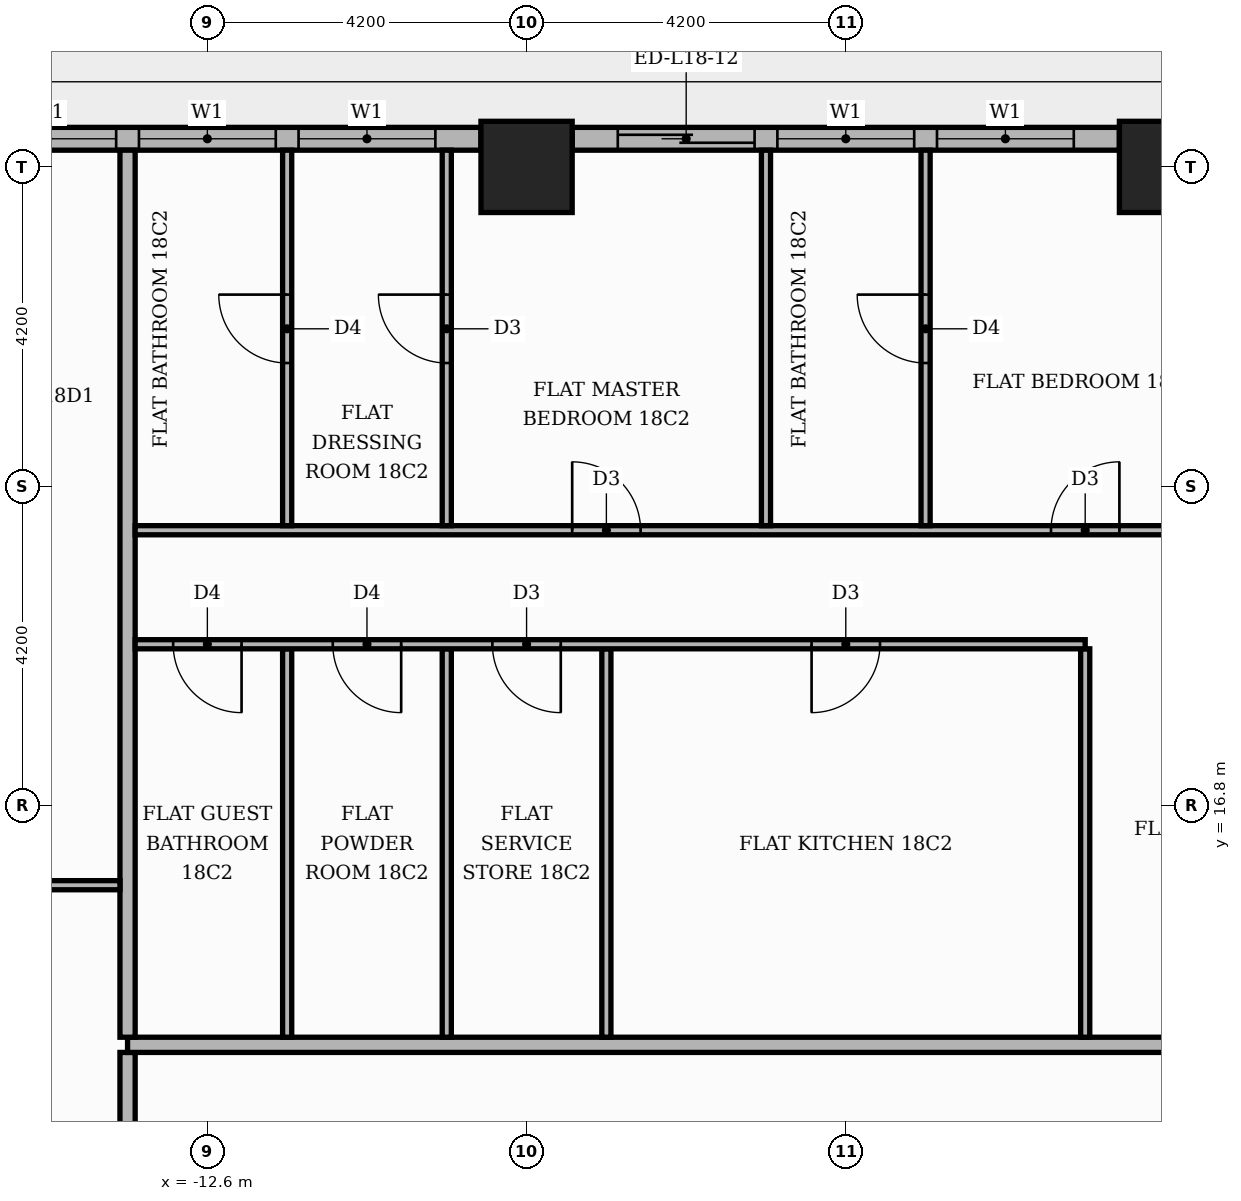
"""IFC4 building model, lengths in metres.
Left out: names, types, materials, properties, quantities, classifications, styles, units other than length and angle.
Written with IfcOpenShell. Run it as: python <this file> out.ifc"""

import sys

from ifc_helpers import new_model, si_unit, direction, frame, frame_2d, origin, origin_2d, place, context, subcontext, project, spatial, rectangle, extrude, element, fill, save


model = new_model("IFC4")
c1 = context("Model", 3, precision=1e-05, world=origin(), true_north=direction((0.0, 1.0)))
c2 = subcontext(c1, "Body", "Model", "MODEL_VIEW")
j1 = project(units=[si_unit("LENGTHUNIT", "METRE"), si_unit("PLANEANGLEUNIT", "RADIAN")], contexts=[c1])
p1 = place(None, origin())
s1 = spatial("IfcSite", under=j1, at=p1, CompositionType="ELEMENT")
p2 = place(p1, origin())
s2 = spatial("IfcBuilding", under=s1, at=p2, CompositionType="ELEMENT")
p3 = place(p2, frame((0.0, 0.0, 79.2)))
s3 = spatial("IfcBuildingStorey", under=s2, at=p3, CompositionType="ELEMENT", Elevation=79.2)
for number, where, z_axis, x_axis in (
    (1, (0.0, 25.2, 0.0), (0.0, 0.0, 1.0), (1.0, 0.0, 0.0)),
    (2, (-8.4, 25.2, 0.0), (0.0, 0.0, 1.0), (1.0, 0.0, 0.0)),
):
    element("IfcColumn", number, at=place(p3, frame(where, z_axis=z_axis, x_axis=x_axis)), inside=s3, PredefinedType="COLUMN", context=c2, shape_type="SweptSolid", body=[
        extrude(rectangle(XDim=1.2, YDim=1.2, at=origin_2d()), origin(), (0.0, 0.0, 1.0), 3.9),
    ])
p4 = place(p3, frame((-0.6, 25.57, 0.0), z_axis=(0.0, 0.0, 1.0), x_axis=(-1.0, 0.0, 0.0)))
e3 = element("IfcWall", 3, at=p4, inside=s3, PredefinedType="STANDARD", context=c2, shape_type="SweptSolid", body=[
    extrude(rectangle(XDim=7.2, YDim=0.3, at=frame_2d((3.6, 0.0))), origin(), (0.0, 0.0, 1.0), 3.48),
])
p5 = place(p4, frame((0.6, 0.0, 0.9)))
e4 = element("IfcOpeningElement", 4, at=p5, cuts=e3, PredefinedType="OPENING", context=c2, shape_type="SweptSolid", body=[
    extrude(rectangle(XDim=1.8, YDim=2.1, at=frame_2d((0.9, 1.05))), frame((0.0, 0.16, 0.0), z_axis=(0.0, -1.0, 0.0), x_axis=(1.0, 0.0, 0.0)), (0.0, 0.0, 1.0), 0.32),
])
p6 = place(p4, frame((2.7, 0.0, 0.9)))
e5 = element("IfcOpeningElement", 5, at=p6, cuts=e3, PredefinedType="OPENING", context=c2, shape_type="SweptSolid", body=[
    extrude(rectangle(XDim=1.8, YDim=2.1, at=frame_2d((0.9, 1.05))), frame((0.0, 0.16, 0.0), z_axis=(0.0, -1.0, 0.0), x_axis=(1.0, 0.0, 0.0)), (0.0, 0.0, 1.0), 0.32),
])
p7 = place(p4, frame((4.8, 0.0, 0.0)))
e6 = element("IfcOpeningElement", 6, at=p7, cuts=e3, PredefinedType="OPENING", context=c2, shape_type="SweptSolid", body=[
    extrude(rectangle(XDim=1.8, YDim=2.4, at=frame_2d((0.9, 1.2))), frame((0.0, 0.16, 0.0), z_axis=(0.0, -1.0, 0.0), x_axis=(1.0, 0.0, 0.0)), (0.0, 0.0, 1.0), 0.32),
])
p8 = place(p3, frame((-9.0, 25.57, 0.0), z_axis=(0.0, 0.0, 1.0), x_axis=(-1.0, 0.0, 0.0)))
e7 = element("IfcWall", 7, at=p8, inside=s3, PredefinedType="STANDARD", context=c2, shape_type="SweptSolid", body=[
    extrude(rectangle(XDim=7.2, YDim=0.3, at=frame_2d((3.6, 0.0))), origin(), (0.0, 0.0, 1.0), 3.48),
])
p9 = place(p8, frame((0.6, 0.0, 0.9)))
e8 = element("IfcOpeningElement", 8, at=p9, cuts=e7, PredefinedType="OPENING", context=c2, shape_type="SweptSolid", body=[
    extrude(rectangle(XDim=1.8, YDim=2.1, at=frame_2d((0.9, 1.05))), frame((0.0, 0.16, 0.0), z_axis=(0.0, -1.0, 0.0), x_axis=(1.0, 0.0, 0.0)), (0.0, 0.0, 1.0), 0.32),
])
p10 = place(p8, frame((2.7, 0.0, 0.9)))
e9 = element("IfcOpeningElement", 9, at=p10, cuts=e7, PredefinedType="OPENING", context=c2, shape_type="SweptSolid", body=[
    extrude(rectangle(XDim=1.8, YDim=2.1, at=frame_2d((0.9, 1.05))), frame((0.0, 0.16, 0.0), z_axis=(0.0, -1.0, 0.0), x_axis=(1.0, 0.0, 0.0)), (0.0, 0.0, 1.0), 0.32),
])
p11 = place(p8, frame((4.8, 0.0, 0.9)))
e10 = element("IfcOpeningElement", 10, at=p11, cuts=e7, PredefinedType="OPENING", context=c2, shape_type="SweptSolid", body=[
    extrude(rectangle(XDim=1.8, YDim=2.1, at=frame_2d((0.9, 1.05))), frame((0.0, 0.16, 0.0), z_axis=(0.0, -1.0, 0.0), x_axis=(1.0, 0.0, 0.0)), (0.0, 0.0, 1.0), 0.32),
])
p12 = place(p3, frame((-13.65, 5.35, 0.0), z_axis=(0.0, 0.0, 1.0), x_axis=(0.0, 1.0, 0.0)))
e11 = element("IfcWall", 11, at=p12, inside=s3, PredefinedType="PARTITIONING", context=c2, shape_type="SweptSolid", body=[
    extrude(rectangle(XDim=8.2, YDim=0.2, at=frame_2d((4.1, 0.0))), origin(), (0.0, 0.0, 1.0), 3.48),
])
p13 = place(p12, frame((5.65, 0.0, 0.0)))
e12 = element("IfcOpeningElement", 12, at=p13, cuts=e11, PredefinedType="OPENING", context=c2, shape_type="SweptSolid", body=[
    extrude(rectangle(XDim=1.1, YDim=2.4, at=frame_2d((0.55, 1.2))), frame((0.0, 0.11, 0.0), z_axis=(0.0, -1.0, 0.0), x_axis=(1.0, 0.0, 0.0)), (0.0, 0.0, 1.0), 0.22),
])
p14 = place(p3, frame((-13.65, 13.65, 0.0), z_axis=(0.0, 0.0, 1.0), x_axis=(1.0, 0.0, 0.0)))
e13 = element("IfcWall", 13, at=p14, inside=s3, PredefinedType="PARTITIONING", context=c2, shape_type="SweptSolid", body=[
    extrude(rectangle(XDim=39.07, YDim=0.2, at=frame_2d((19.535, 0.0))), origin(), (0.0, 0.0, 1.0), 3.48),
])
p15 = place(p14, frame((24.65, 0.0, 0.0)))
e14 = element("IfcOpeningElement", 14, at=p15, cuts=e13, PredefinedType="OPENING", context=c2, shape_type="SweptSolid", body=[
    extrude(rectangle(XDim=1.1, YDim=2.4, at=frame_2d((0.55, 1.2))), frame((0.0, 0.11, 0.0), z_axis=(0.0, -1.0, 0.0), x_axis=(1.0, 0.0, 0.0)), (0.0, 0.0, 1.0), 0.22),
])
p16 = place(p14, frame((14.15, 0.0, 0.0)))
e15 = element("IfcOpeningElement", 15, at=p16, cuts=e13, PredefinedType="OPENING", context=c2, shape_type="SweptSolid", body=[
    extrude(rectangle(XDim=1.1, YDim=2.4, at=frame_2d((0.55, 1.2))), frame((0.0, 0.11, 0.0), z_axis=(0.0, -1.0, 0.0), x_axis=(1.0, 0.0, 0.0)), (0.0, 0.0, 1.0), 0.22),
])
p17 = place(p3, frame((-13.65, 13.75, 0.0), z_axis=(0.0, 0.0, 1.0), x_axis=(0.0, 1.0, 0.0)))
e16 = element("IfcWall", 16, at=p17, inside=s3, PredefinedType="PARTITIONING", context=c2, shape_type="SweptSolid", body=[
    extrude(rectangle(XDim=11.67, YDim=0.2, at=frame_2d((5.835, 0.0))), origin(), (0.0, 0.0, 1.0), 3.48),
])
for number, where, z_axis, x_axis in (
    (17, (-11.55, 13.75, 0.0), (0.0, 0.0, 1.0), (0.0, 1.0, 0.0)),
    (18, (-9.45, 13.75, 0.0), (0.0, 0.0, 1.0), (0.0, 1.0, 0.0)),
    (19, (-7.35, 13.75, 0.0), (0.0, 0.0, 1.0), (0.0, 1.0, 0.0)),
    (20, (-1.05, 13.75, 0.0), (0.0, 0.0, 1.0), (0.0, 1.0, 0.0)),
):
    element("IfcWall", number, at=place(p3, frame(where, z_axis=z_axis, x_axis=x_axis)), inside=s3, PredefinedType="PARTITIONING", context=c2, shape_type="SweptSolid", body=[
        extrude(rectangle(XDim=5.11, YDim=0.12, at=frame_2d((2.555, 0.0))), origin(), (0.0, 0.0, 1.0), 3.48),
    ])
p18 = place(p3, frame((-19.82, 15.75, 0.0), z_axis=(0.0, 0.0, 1.0), x_axis=(1.0, 0.0, 0.0)))
e21 = element("IfcWall", 21, at=p18, inside=s3, PredefinedType="PARTITIONING", context=c2, shape_type="SweptSolid", body=[
    extrude(rectangle(XDim=6.07, YDim=0.12, at=frame_2d((3.035, 0.0))), origin(), (0.0, 0.0, 1.0), 3.48),
])
p19 = place(p18, frame((2.585, 0.0, 0.0)))
e22 = element("IfcOpeningElement", 22, at=p19, cuts=e21, PredefinedType="OPENING", context=c2, shape_type="SweptSolid", body=[
    extrude(rectangle(XDim=1.0, YDim=2.1, at=frame_2d((0.5, 1.05))), frame((0.0, 0.07, 0.0), z_axis=(0.0, -1.0, 0.0), x_axis=(1.0, 0.0, 0.0)), (0.0, 0.0, 1.0), 0.14),
])
p20 = place(p3, frame((-13.55, 18.92, 0.0), z_axis=(0.0, 0.0, 1.0), x_axis=(1.0, 0.0, 0.0)))
e23 = element("IfcWall", 23, at=p20, inside=s3, PredefinedType="PARTITIONING", context=c2, shape_type="SweptSolid", body=[
    extrude(rectangle(XDim=12.5, YDim=0.12, at=frame_2d((6.25, 0.0))), origin(), (0.0, 0.0, 1.0), 3.48),
])
p21 = place(p20, frame((8.9, 0.0, 0.0)))
e24 = element("IfcOpeningElement", 24, at=p21, cuts=e23, PredefinedType="OPENING", context=c2, shape_type="SweptSolid", body=[
    extrude(rectangle(XDim=0.9, YDim=2.1, at=frame_2d((0.45, 1.05))), frame((0.0, 0.07, 0.0), z_axis=(0.0, -1.0, 0.0), x_axis=(1.0, 0.0, 0.0)), (0.0, 0.0, 1.0), 0.14),
])
p22 = place(p20, frame((4.7, 0.0, 0.0)))
e25 = element("IfcOpeningElement", 25, at=p22, cuts=e23, PredefinedType="OPENING", context=c2, shape_type="SweptSolid", body=[
    extrude(rectangle(XDim=0.9, YDim=2.1, at=frame_2d((0.45, 1.05))), frame((0.0, 0.07, 0.0), z_axis=(0.0, -1.0, 0.0), x_axis=(1.0, 0.0, 0.0)), (0.0, 0.0, 1.0), 0.14),
])
p23 = place(p20, frame((2.6, 0.0, 0.0)))
e26 = element("IfcOpeningElement", 26, at=p23, cuts=e23, PredefinedType="OPENING", context=c2, shape_type="SweptSolid", body=[
    extrude(rectangle(XDim=0.9, YDim=2.1, at=frame_2d((0.45, 1.05))), frame((0.0, 0.07, 0.0), z_axis=(0.0, -1.0, 0.0), x_axis=(1.0, 0.0, 0.0)), (0.0, 0.0, 1.0), 0.14),
])
p24 = place(p20, frame((0.5, 0.0, 0.0)))
e27 = element("IfcOpeningElement", 27, at=p24, cuts=e23, PredefinedType="OPENING", context=c2, shape_type="SweptSolid", body=[
    extrude(rectangle(XDim=0.9, YDim=2.1, at=frame_2d((0.45, 1.05))), frame((0.0, 0.07, 0.0), z_axis=(0.0, -1.0, 0.0), x_axis=(1.0, 0.0, 0.0)), (0.0, 0.0, 1.0), 0.14),
])
p25 = place(p3, frame((-13.55, 20.42, 0.0), z_axis=(0.0, 0.0, 1.0), x_axis=(1.0, 0.0, 0.0)))
e28 = element("IfcWall", 28, at=p25, inside=s3, PredefinedType="PARTITIONING", context=c2, shape_type="SweptSolid", body=[
    extrude(rectangle(XDim=18.7, YDim=0.12, at=frame_2d((9.35, 0.0))), origin(), (0.0, 0.0, 1.0), 3.48),
])
p26 = place(p25, frame((16.2, 0.0, 0.0)))
e29 = element("IfcOpeningElement", 29, at=p26, cuts=e28, PredefinedType="OPENING", context=c2, shape_type="SweptSolid", body=[
    extrude(rectangle(XDim=1.0, YDim=2.1, at=frame_2d((0.5, 1.05))), frame((0.0, 0.07, 0.0), z_axis=(0.0, -1.0, 0.0), x_axis=(1.0, 0.0, 0.0)), (0.0, 0.0, 1.0), 0.14),
])
p27 = place(p25, frame((12.05, 0.0, 0.0)))
e30 = element("IfcOpeningElement", 30, at=p27, cuts=e28, PredefinedType="OPENING", context=c2, shape_type="SweptSolid", body=[
    extrude(rectangle(XDim=0.9, YDim=2.1, at=frame_2d((0.45, 1.05))), frame((0.0, 0.07, 0.0), z_axis=(0.0, -1.0, 0.0), x_axis=(1.0, 0.0, 0.0)), (0.0, 0.0, 1.0), 0.14),
])
p28 = place(p25, frame((5.75, 0.0, 0.0)))
e31 = element("IfcOpeningElement", 31, at=p28, cuts=e28, PredefinedType="OPENING", context=c2, shape_type="SweptSolid", body=[
    extrude(rectangle(XDim=0.9, YDim=2.1, at=frame_2d((0.45, 1.05))), frame((0.0, 0.07, 0.0), z_axis=(0.0, -1.0, 0.0), x_axis=(1.0, 0.0, 0.0)), (0.0, 0.0, 1.0), 0.14),
])
p29 = place(p3, frame((-11.55, 20.48, 0.0), z_axis=(0.0, 0.0, 1.0), x_axis=(0.0, 1.0, 0.0)))
e32 = element("IfcWall", 32, at=p29, inside=s3, PredefinedType="PARTITIONING", context=c2, shape_type="SweptSolid", body=[
    extrude(rectangle(XDim=4.94, YDim=0.12, at=frame_2d((2.47, 0.0))), origin(), (0.0, 0.0, 1.0), 3.48),
])
p30 = place(p29, frame((2.14, 0.0, 0.0)))
e33 = element("IfcOpeningElement", 33, at=p30, cuts=e32, PredefinedType="OPENING", context=c2, shape_type="SweptSolid", body=[
    extrude(rectangle(XDim=0.9, YDim=2.1, at=frame_2d((0.45, 1.05))), frame((0.0, 0.07, 0.0), z_axis=(0.0, -1.0, 0.0), x_axis=(1.0, 0.0, 0.0)), (0.0, 0.0, 1.0), 0.14),
])
p31 = place(p3, frame((-9.45, 20.48, 0.0), z_axis=(0.0, 0.0, 1.0), x_axis=(0.0, 1.0, 0.0)))
e34 = element("IfcWall", 34, at=p31, inside=s3, PredefinedType="PARTITIONING", context=c2, shape_type="SweptSolid", body=[
    extrude(rectangle(XDim=4.94, YDim=0.12, at=frame_2d((2.47, 0.0))), origin(), (0.0, 0.0, 1.0), 3.48),
])
p32 = place(p31, frame((2.14, 0.0, 0.0)))
e35 = element("IfcOpeningElement", 35, at=p32, cuts=e34, PredefinedType="OPENING", context=c2, shape_type="SweptSolid", body=[
    extrude(rectangle(XDim=0.9, YDim=2.1, at=frame_2d((0.45, 1.05))), frame((0.0, 0.07, 0.0), z_axis=(0.0, -1.0, 0.0), x_axis=(1.0, 0.0, 0.0)), (0.0, 0.0, 1.0), 0.14),
])
p33 = place(p3, frame((-5.25, 20.48, 0.0), z_axis=(0.0, 0.0, 1.0), x_axis=(0.0, 1.0, 0.0)))
e36 = element("IfcWall", 36, at=p33, inside=s3, PredefinedType="PARTITIONING", context=c2, shape_type="SweptSolid", body=[
    extrude(rectangle(XDim=4.94, YDim=0.12, at=frame_2d((2.47, 0.0))), origin(), (0.0, 0.0, 1.0), 3.48),
])
p34 = place(p3, frame((-3.15, 20.48, 0.0), z_axis=(0.0, 0.0, 1.0), x_axis=(0.0, 1.0, 0.0)))
e37 = element("IfcWall", 37, at=p34, inside=s3, PredefinedType="PARTITIONING", context=c2, shape_type="SweptSolid", body=[
    extrude(rectangle(XDim=4.94, YDim=0.12, at=frame_2d((2.47, 0.0))), origin(), (0.0, 0.0, 1.0), 3.48),
])
p35 = place(p34, frame((2.14, 0.0, 0.0)))
e38 = element("IfcOpeningElement", 38, at=p35, cuts=e37, PredefinedType="OPENING", context=c2, shape_type="SweptSolid", body=[
    extrude(rectangle(XDim=0.9, YDim=2.1, at=frame_2d((0.45, 1.05))), frame((0.0, 0.07, 0.0), z_axis=(0.0, -1.0, 0.0), x_axis=(1.0, 0.0, 0.0)), (0.0, 0.0, 1.0), 0.14),
])
p36 = place(p5, origin())
e39 = element("IfcWindow", 39, at=p36, inside=s3, PartitioningType="SINGLE_PANEL", PredefinedType="WINDOW", context=c2, shape_type="SweptSolid", body=[
    extrude(rectangle(XDim=1.8, YDim=2.1, at=frame_2d((0.9, 1.05))), frame((0.0, 0.03, 0.0), z_axis=(0.0, -1.0, 0.0), x_axis=(1.0, 0.0, 0.0)), (0.0, 0.0, 1.0), 0.06),
])
fill(e4, e39)
p37 = place(p6, origin())
e40 = element("IfcWindow", 40, at=p37, inside=s3, PartitioningType="SINGLE_PANEL", PredefinedType="WINDOW", context=c2, shape_type="SweptSolid", body=[
    extrude(rectangle(XDim=1.8, YDim=2.1, at=frame_2d((0.9, 1.05))), frame((0.0, 0.03, 0.0), z_axis=(0.0, -1.0, 0.0), x_axis=(1.0, 0.0, 0.0)), (0.0, 0.0, 1.0), 0.06),
])
fill(e5, e40)
p38 = place(p7, origin())
e41 = element("IfcDoor", 41, at=p38, inside=s3, OperationType="SLIDING_TO_RIGHT", PredefinedType="DOOR", context=c2, shape_type="SweptSolid", body=[
    extrude(rectangle(XDim=1.8, YDim=2.4, at=frame_2d((0.9, 1.2))), frame((0.0, 0.025, 0.0), z_axis=(0.0, -1.0, 0.0), x_axis=(1.0, 0.0, 0.0)), (0.0, 0.0, 1.0), 0.05),
])
fill(e6, e41)
p39 = place(p9, origin())
e42 = element("IfcWindow", 42, at=p39, inside=s3, PartitioningType="SINGLE_PANEL", PredefinedType="WINDOW", context=c2, shape_type="SweptSolid", body=[
    extrude(rectangle(XDim=1.8, YDim=2.1, at=frame_2d((0.9, 1.05))), frame((0.0, 0.03, 0.0), z_axis=(0.0, -1.0, 0.0), x_axis=(1.0, 0.0, 0.0)), (0.0, 0.0, 1.0), 0.06),
])
fill(e8, e42)
p40 = place(p10, origin())
e43 = element("IfcWindow", 43, at=p40, inside=s3, PartitioningType="SINGLE_PANEL", PredefinedType="WINDOW", context=c2, shape_type="SweptSolid", body=[
    extrude(rectangle(XDim=1.8, YDim=2.1, at=frame_2d((0.9, 1.05))), frame((0.0, 0.03, 0.0), z_axis=(0.0, -1.0, 0.0), x_axis=(1.0, 0.0, 0.0)), (0.0, 0.0, 1.0), 0.06),
])
fill(e9, e43)
p41 = place(p11, origin())
e44 = element("IfcWindow", 44, at=p41, inside=s3, PartitioningType="SINGLE_PANEL", PredefinedType="WINDOW", context=c2, shape_type="SweptSolid", body=[
    extrude(rectangle(XDim=1.8, YDim=2.1, at=frame_2d((0.9, 1.05))), frame((0.0, 0.03, 0.0), z_axis=(0.0, -1.0, 0.0), x_axis=(1.0, 0.0, 0.0)), (0.0, 0.0, 1.0), 0.06),
])
fill(e10, e44)
p42 = place(p21, frame((0.9, 0.0, 0.0), z_axis=(0.0, 0.0, 1.0), x_axis=(-1.0, 0.0, 0.0)))
e45 = element("IfcDoor", 45, at=p42, inside=s3, OperationType="SINGLE_SWING_LEFT", PredefinedType="DOOR", context=c2, shape_type="SweptSolid", body=[
    extrude(rectangle(XDim=0.9, YDim=2.1, at=frame_2d((0.45, 1.05))), frame((0.0, 0.025, 0.0), z_axis=(0.0, -1.0, 0.0), x_axis=(1.0, 0.0, 0.0)), (0.0, 0.0, 1.0), 0.05),
])
fill(e24, e45)
p43 = place(p22, frame((0.9, 0.0, 0.0), z_axis=(0.0, 0.0, 1.0), x_axis=(-1.0, 0.0, 0.0)))
e46 = element("IfcDoor", 46, at=p43, inside=s3, OperationType="SINGLE_SWING_RIGHT", PredefinedType="DOOR", context=c2, shape_type="SweptSolid", body=[
    extrude(rectangle(XDim=0.9, YDim=2.1, at=frame_2d((0.45, 1.05))), frame((0.0, 0.025, 0.0), z_axis=(0.0, -1.0, 0.0), x_axis=(1.0, 0.0, 0.0)), (0.0, 0.0, 1.0), 0.05),
])
fill(e25, e46)
p44 = place(p23, frame((0.9, 0.0, 0.0), z_axis=(0.0, 0.0, 1.0), x_axis=(-1.0, 0.0, 0.0)))
e47 = element("IfcDoor", 47, at=p44, inside=s3, OperationType="SINGLE_SWING_RIGHT", PredefinedType="DOOR", context=c2, shape_type="SweptSolid", body=[
    extrude(rectangle(XDim=0.9, YDim=2.1, at=frame_2d((0.45, 1.05))), frame((0.0, 0.025, 0.0), z_axis=(0.0, -1.0, 0.0), x_axis=(1.0, 0.0, 0.0)), (0.0, 0.0, 1.0), 0.05),
])
fill(e26, e47)
p45 = place(p24, frame((0.9, 0.0, 0.0), z_axis=(0.0, 0.0, 1.0), x_axis=(-1.0, 0.0, 0.0)))
e48 = element("IfcDoor", 48, at=p45, inside=s3, OperationType="SINGLE_SWING_RIGHT", PredefinedType="DOOR", context=c2, shape_type="SweptSolid", body=[
    extrude(rectangle(XDim=0.9, YDim=2.1, at=frame_2d((0.45, 1.05))), frame((0.0, 0.025, 0.0), z_axis=(0.0, -1.0, 0.0), x_axis=(1.0, 0.0, 0.0)), (0.0, 0.0, 1.0), 0.05),
])
fill(e27, e48)
p46 = place(p27, origin())
e49 = element("IfcDoor", 49, at=p46, inside=s3, OperationType="SINGLE_SWING_RIGHT", PredefinedType="DOOR", context=c2, shape_type="SweptSolid", body=[
    extrude(rectangle(XDim=0.9, YDim=2.1, at=frame_2d((0.45, 1.05))), frame((0.0, 0.025, 0.0), z_axis=(0.0, -1.0, 0.0), x_axis=(1.0, 0.0, 0.0)), (0.0, 0.0, 1.0), 0.05),
])
fill(e30, e49)
p47 = place(p35, origin())
e50 = element("IfcDoor", 50, at=p47, inside=s3, OperationType="SINGLE_SWING_RIGHT", PredefinedType="DOOR", context=c2, shape_type="SweptSolid", body=[
    extrude(rectangle(XDim=0.9, YDim=2.1, at=frame_2d((0.45, 1.05))), frame((0.0, 0.025, 0.0), z_axis=(0.0, -1.0, 0.0), x_axis=(1.0, 0.0, 0.0)), (0.0, 0.0, 1.0), 0.05),
])
fill(e38, e50)
p48 = place(p28, origin())
e51 = element("IfcDoor", 51, at=p48, inside=s3, OperationType="SINGLE_SWING_LEFT", PredefinedType="DOOR", context=c2, shape_type="SweptSolid", body=[
    extrude(rectangle(XDim=0.9, YDim=2.1, at=frame_2d((0.45, 1.05))), frame((0.0, 0.025, 0.0), z_axis=(0.0, -1.0, 0.0), x_axis=(1.0, 0.0, 0.0)), (0.0, 0.0, 1.0), 0.05),
])
fill(e31, e51)
p49 = place(p32, origin())
e52 = element("IfcDoor", 52, at=p49, inside=s3, OperationType="SINGLE_SWING_RIGHT", PredefinedType="DOOR", context=c2, shape_type="SweptSolid", body=[
    extrude(rectangle(XDim=0.9, YDim=2.1, at=frame_2d((0.45, 1.05))), frame((0.0, 0.025, 0.0), z_axis=(0.0, -1.0, 0.0), x_axis=(1.0, 0.0, 0.0)), (0.0, 0.0, 1.0), 0.05),
])
fill(e35, e52)
p50 = place(p30, origin())
e53 = element("IfcDoor", 53, at=p50, inside=s3, OperationType="SINGLE_SWING_RIGHT", PredefinedType="DOOR", context=c2, shape_type="SweptSolid", body=[
    extrude(rectangle(XDim=0.9, YDim=2.1, at=frame_2d((0.45, 1.05))), frame((0.0, 0.025, 0.0), z_axis=(0.0, -1.0, 0.0), x_axis=(1.0, 0.0, 0.0)), (0.0, 0.0, 1.0), 0.05),
])
fill(e33, e53)
save(model, sys.argv[1])
